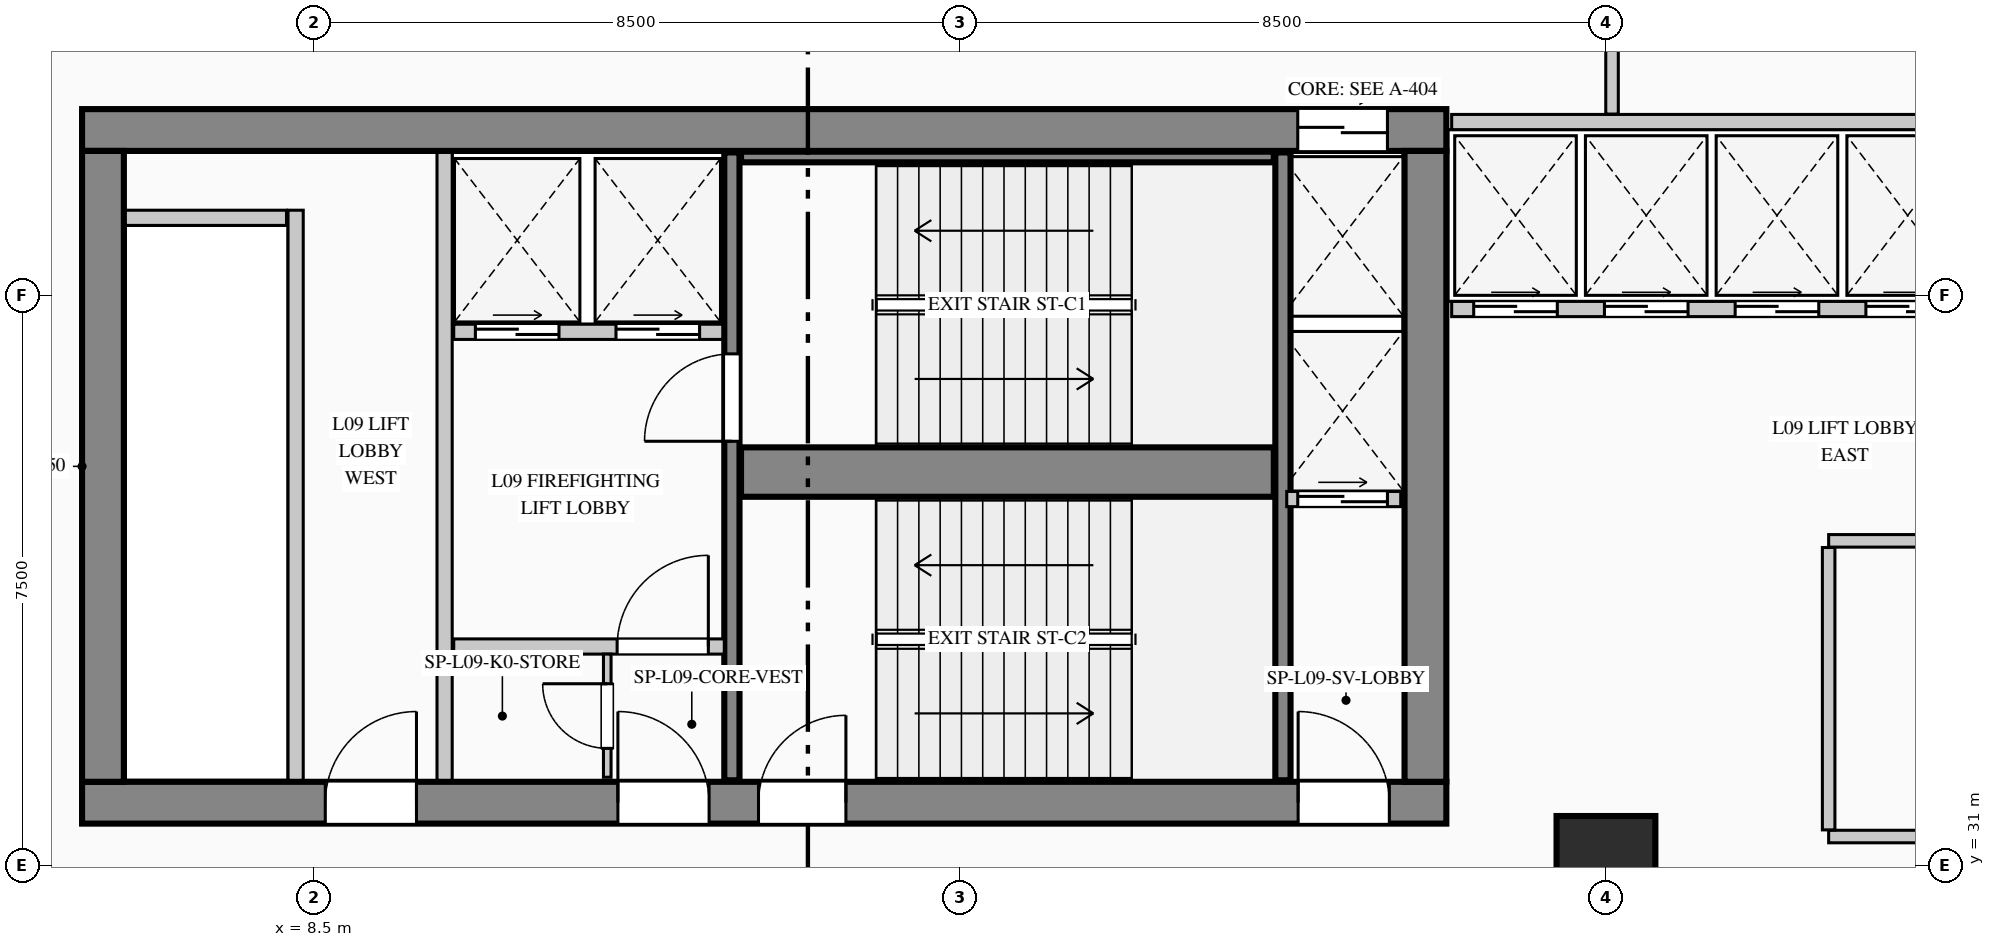
"""IFC4 building model, lengths in metres.
Left out: names, types, materials, properties, quantities, classifications, styles, units other than length and angle.
Written with IfcOpenShell. Run it as: python <this file> out.ifc"""

import sys

from ifc_helpers import new_model, si_unit, direction, frame, frame_2d, origin, origin_2d, place, context, subcontext, project, spatial, rectangle, extrude, element, fill, save


model = new_model("IFC4")
c1 = context("Model", 3, precision=1e-05, world=origin(), true_north=direction((0.0, 1.0)))
c2 = subcontext(c1, "Body", "Model", "MODEL_VIEW")
j1 = project(units=[si_unit("LENGTHUNIT", "METRE"), si_unit("PLANEANGLEUNIT", "RADIAN")], contexts=[c1])
p1 = place(None, origin())
s1 = spatial("IfcSite", under=j1, at=p1, CompositionType="ELEMENT")
p2 = place(p1, origin())
s2 = spatial("IfcBuilding", under=s1, at=p2, CompositionType="ELEMENT")
p3 = place(p2, frame((0.0, 0.0, 40.2)))
s3 = spatial("IfcBuildingStorey", under=s2, at=p3, CompositionType="ELEMENT", Elevation=40.2)
p4 = place(p3, frame((5.45, 40.675, 0.0), z_axis=(0.0, 0.0, 1.0), x_axis=(1.0, 0.0, 0.0)))
e1 = element("IfcWall", 1, at=p4, inside=s3, PredefinedType="SHEAR", context=c2, shape_type="SweptSolid", body=[
    extrude(rectangle(XDim=17.95, YDim=0.55, at=frame_2d((8.975, 0.0))), origin(), (0.0, 0.0, 1.0), 4.4),
])
p5 = place(p4, frame((15.995, 0.0, 0.0)))
e2 = element("IfcOpeningElement", 2, at=p5, cuts=e1, PredefinedType="OPENING", context=c2, shape_type="SweptSolid", body=[
    extrude(rectangle(XDim=1.18, YDim=2.25, at=frame_2d((0.59, 1.125))), frame((0.0, 0.285, 0.0), z_axis=(0.0, -1.0, 0.0), x_axis=(1.0, 0.0, 0.0)), (0.0, 0.0, 1.0), 0.57),
])
p6 = place(p3, frame((5.45, 31.825, 0.0), z_axis=(0.0, 0.0, 1.0), x_axis=(1.0, 0.0, 0.0)))
e3 = element("IfcWall", 3, at=p6, inside=s3, PredefinedType="SHEAR", context=c2, shape_type="SweptSolid", body=[
    extrude(rectangle(XDim=17.95, YDim=0.55, at=frame_2d((8.975, 0.0))), origin(), (0.0, 0.0, 1.0), 4.4),
])
p7 = place(p6, frame((3.2, 0.0, 0.0)))
e4 = element("IfcOpeningElement", 4, at=p7, cuts=e3, PredefinedType="OPENING", context=c2, shape_type="SweptSolid", body=[
    extrude(rectangle(XDim=1.2, YDim=2.2, at=frame_2d((0.6, 1.1))), frame((0.0, 0.285, 0.0), z_axis=(0.0, -1.0, 0.0), x_axis=(1.0, 0.0, 0.0)), (0.0, 0.0, 1.0), 0.57),
])
p8 = place(p6, frame((7.05, 0.0, 0.0)))
e5 = element("IfcOpeningElement", 5, at=p8, cuts=e3, PredefinedType="OPENING", context=c2, shape_type="SweptSolid", body=[
    extrude(rectangle(XDim=1.2, YDim=2.2, at=frame_2d((0.6, 1.1))), frame((0.0, 0.285, 0.0), z_axis=(0.0, -1.0, 0.0), x_axis=(1.0, 0.0, 0.0)), (0.0, 0.0, 1.0), 0.57),
])
p9 = place(p6, frame((8.9, 0.0, 0.0)))
e6 = element("IfcOpeningElement", 6, at=p9, cuts=e3, PredefinedType="OPENING", context=c2, shape_type="SweptSolid", body=[
    extrude(rectangle(XDim=1.15, YDim=2.2, at=frame_2d((0.575, 1.1))), frame((0.0, 0.285, 0.0), z_axis=(0.0, -1.0, 0.0), x_axis=(1.0, 0.0, 0.0)), (0.0, 0.0, 1.0), 0.57),
])
p10 = place(p6, frame((16.0, 0.0, 0.0)))
e7 = element("IfcOpeningElement", 7, at=p10, cuts=e3, PredefinedType="OPENING", context=c2, shape_type="SweptSolid", body=[
    extrude(rectangle(XDim=1.2, YDim=2.2, at=frame_2d((0.6, 1.1))), frame((0.0, 0.285, 0.0), z_axis=(0.0, -1.0, 0.0), x_axis=(1.0, 0.0, 0.0)), (0.0, 0.0, 1.0), 0.57),
])
for number, where, z_axis, x_axis in (
    (8, (5.725, 32.1, 0.0), (0.0, 0.0, 1.0), (0.0, 1.0, 0.0)),
    (9, (23.125, 32.1, 0.0), (0.0, 0.0, 1.0), (0.0, 1.0, 0.0)),
):
    element("IfcWall", number, at=place(p3, frame(where, z_axis=z_axis, x_axis=x_axis)), inside=s3, PredefinedType="SHEAR", context=c2, shape_type="SweptSolid", body=[
        extrude(rectangle(XDim=8.3, YDim=0.55, at=frame_2d((4.15, 0.0))), origin(), (0.0, 0.0, 1.0), 4.4),
    ])
p11 = place(p3, frame((14.0, 32.12, 0.0), z_axis=(0.0, 0.0, 1.0), x_axis=(0.0, 1.0, 0.0)))
e10 = element("IfcWall", 10, at=p11, inside=s3, PredefinedType="SHEAR", context=c2, shape_type="SweptSolid", body=[
    extrude(rectangle(XDim=8.26, YDim=0.2, at=frame_2d((4.13, 0.0))), origin(), (0.0, 0.0, 1.0), 4.4),
])
p12 = place(p11, frame((4.46, 0.0, 0.0)))
e11 = element("IfcOpeningElement", 11, at=p12, cuts=e10, PredefinedType="OPENING", context=c2, shape_type="SweptSolid", body=[
    extrude(rectangle(XDim=1.15, YDim=2.2, at=frame_2d((0.575, 1.1))), frame((0.0, 0.11, 0.0), z_axis=(0.0, -1.0, 0.0), x_axis=(1.0, 0.0, 0.0)), (0.0, 0.0, 1.0), 0.22),
])
p13 = place(p3, frame((14.12, 36.175, 0.0), z_axis=(0.0, 0.0, 1.0), x_axis=(1.0, 0.0, 0.0)))
e12 = element("IfcWall", 12, at=p13, inside=s3, PredefinedType="SHEAR", context=c2, shape_type="SweptSolid", body=[
    extrude(rectangle(XDim=7.01, YDim=0.65, at=frame_2d((3.505, 0.0))), origin(), (0.0, 0.0, 1.0), 4.4),
])
p14 = place(p3, frame((21.25, 32.12, 0.0), z_axis=(0.0, 0.0, 1.0), x_axis=(0.0, 1.0, 0.0)))
e13 = element("IfcWall", 13, at=p14, inside=s3, PredefinedType="SHEAR", context=c2, shape_type="SweptSolid", body=[
    extrude(rectangle(XDim=8.26, YDim=0.2, at=frame_2d((4.13, 0.0))), origin(), (0.0, 0.0, 1.0), 4.4),
])
p15 = place(p3, frame((14.12, 40.32, 0.0), z_axis=(0.0, 0.0, 1.0), x_axis=(1.0, 0.0, 0.0)))
e14 = element("IfcWall", 14, at=p15, inside=s3, PredefinedType="SHEAR", context=c2, shape_type="SweptSolid", body=[
    extrude(rectangle(XDim=7.01, YDim=0.14, at=frame_2d((3.505, 0.0))), origin(), (0.0, 0.0, 1.0), 4.4),
])
p16 = place(p3, frame((25.5, 31.0, 0.0), z_axis=(0.0, 0.0, 1.0), x_axis=(1.0, 0.0, 0.0)))
e15 = element("IfcColumn", 15, at=p16, inside=s3, PredefinedType="COLUMN", context=c2, shape_type="SweptSolid", body=[
    extrude(rectangle(XDim=1.3, YDim=1.3, at=origin_2d()), origin(), (0.0, 0.0, 1.0), 4.4),
])
p17 = place(p3, frame((8.523, 4.84, 0.0), z_axis=(0.0, 0.0, 1.0), x_axis=(-0.150394554312, 0.988626055712, 0.0)))
e16 = element("IfcWall", 16, at=p17, inside=s3, PredefinedType="STANDARD", context=c2, shape_type="SweptSolid", body=[
    extrude(rectangle(XDim=36.738, YDim=0.28, at=frame_2d((18.369, 0.0))), origin(), (0.0, 0.0, 1.0), 4.1),
])
p18 = place(p17, frame((22.762, 0.0, 0.9)))
e17 = element("IfcOpeningElement", 17, at=p18, cuts=e16, PredefinedType="OPENING", context=c2, shape_type="SweptSolid", body=[
    extrude(rectangle(XDim=1.5, YDim=1.8, at=frame_2d((0.75, 0.9))), frame((0.0, 0.15, 0.0), z_axis=(0.0, -1.0, 0.0), x_axis=(1.0, 0.0, 0.0)), (0.0, 0.0, 1.0), 0.3),
])
p19 = place(p3, frame((8.26, 32.12, 0.0), z_axis=(0.0, 0.0, 1.0), x_axis=(0.0, 1.0, 0.0)))
e18 = element("IfcWall", 18, at=p19, inside=s3, PredefinedType="PARTITIONING", context=c2, shape_type="SweptSolid", body=[
    extrude(rectangle(XDim=7.5, YDim=0.2, at=frame_2d((3.75, 0.0))), origin(), (0.0, 0.0, 1.0), 4.1),
])
p20 = place(p3, frame((6.02, 39.52, 0.0), z_axis=(0.0, 0.0, 1.0), x_axis=(1.0, 0.0, 0.0)))
e19 = element("IfcWall", 19, at=p20, inside=s3, PredefinedType="PARTITIONING", context=c2, shape_type="SweptSolid", body=[
    extrude(rectangle(XDim=2.12, YDim=0.2, at=frame_2d((1.06, 0.0))), origin(), (0.0, 0.0, 1.0), 4.1),
])
p21 = place(p3, frame((10.22, 32.12, 0.0), z_axis=(0.0, 0.0, 1.0), x_axis=(0.0, 1.0, 0.0)))
e20 = element("IfcWall", 20, at=p21, inside=s3, PredefinedType="PARTITIONING", context=c2, shape_type="SweptSolid", body=[
    extrude(rectangle(XDim=8.26, YDim=0.2, at=frame_2d((4.13, 0.0))), origin(), (0.0, 0.0, 1.0), 4.1),
])
p22 = place(p3, frame((10.34, 38.02, 0.0), z_axis=(0.0, 0.0, 1.0), x_axis=(1.0, 0.0, 0.0)))
e21 = element("IfcWall", 21, at=p22, inside=s3, PredefinedType="PARTITIONING", context=c2, shape_type="SweptSolid", body=[
    extrude(rectangle(XDim=3.54, YDim=0.2, at=frame_2d((1.77, 0.0))), origin(), (0.0, 0.0, 1.0), 4.1),
])
p23 = place(p22, frame((0.285, 0.0, 0.0)))
e22 = element("IfcOpeningElement", 22, at=p23, cuts=e21, PredefinedType="OPENING", context=c2, shape_type="SweptSolid", body=[
    extrude(rectangle(XDim=1.1, YDim=2.2, at=frame_2d((0.55, 1.1))), frame((0.0, 0.11, 0.0), z_axis=(0.0, -1.0, 0.0), x_axis=(1.0, 0.0, 0.0)), (0.0, 0.0, 1.0), 0.22),
])
p24 = place(p22, frame((2.135, 0.0, 0.0)))
e23 = element("IfcOpeningElement", 23, at=p24, cuts=e21, PredefinedType="OPENING", context=c2, shape_type="SweptSolid", body=[
    extrude(rectangle(XDim=1.1, YDim=2.2, at=frame_2d((0.55, 1.1))), frame((0.0, 0.11, 0.0), z_axis=(0.0, -1.0, 0.0), x_axis=(1.0, 0.0, 0.0)), (0.0, 0.0, 1.0), 0.22),
])
p25 = place(p3, frame((10.34, 33.88, 0.0), z_axis=(0.0, 0.0, 1.0), x_axis=(1.0, 0.0, 0.0)))
e24 = element("IfcWall", 24, at=p25, inside=s3, PredefinedType="PARTITIONING", context=c2, shape_type="SweptSolid", body=[
    extrude(rectangle(XDim=3.56, YDim=0.2, at=frame_2d((1.78, 0.0))), origin(), (0.0, 0.0, 1.0), 4.1),
])
p26 = place(p25, frame((2.15, 0.0, 0.0)))
e25 = element("IfcOpeningElement", 25, at=p26, cuts=e24, PredefinedType="OPENING", context=c2, shape_type="SweptSolid", body=[
    extrude(rectangle(XDim=1.2, YDim=2.2, at=frame_2d((0.6, 1.1))), frame((0.0, 0.11, 0.0), z_axis=(0.0, -1.0, 0.0), x_axis=(1.0, 0.0, 0.0)), (0.0, 0.0, 1.0), 0.22),
])
p27 = place(p3, frame((12.36, 32.16, 0.0), z_axis=(0.0, 0.0, 1.0), x_axis=(0.0, 1.0, 0.0)))
e26 = element("IfcWall", 26, at=p27, inside=s3, PredefinedType="PARTITIONING", context=c2, shape_type="SweptSolid", body=[
    extrude(rectangle(XDim=1.62, YDim=0.1, at=frame_2d((0.81, 0.0))), origin(), (0.0, 0.0, 1.0), 4.1),
])
p28 = place(p27, frame((0.38, 0.0, 0.0)))
e27 = element("IfcOpeningElement", 27, at=p28, cuts=e26, PredefinedType="OPENING", context=c2, shape_type="SweptSolid", body=[
    extrude(rectangle(XDim=0.85, YDim=2.1, at=frame_2d((0.425, 1.05))), frame((0.0, 0.06, 0.0), z_axis=(0.0, -1.0, 0.0), x_axis=(1.0, 0.0, 0.0)), (0.0, 0.0, 1.0), 0.12),
])
p29 = place(p3, frame((21.3, 35.82, 0.0), z_axis=(0.0, 0.0, 1.0), x_axis=(1.0, 0.0, 0.0)))
e28 = element("IfcWall", 28, at=p29, inside=s3, PredefinedType="PARTITIONING", context=c2, shape_type="SweptSolid", body=[
    extrude(rectangle(XDim=1.5, YDim=0.2, at=frame_2d((0.75, 0.0))), origin(), (0.0, 0.0, 1.0), 4.1),
])
p30 = place(p29, frame((0.145, 0.0, 0.0)))
e29 = element("IfcOpeningElement", 29, at=p30, cuts=e28, PredefinedType="OPENING", context=c2, shape_type="SweptSolid", body=[
    extrude(rectangle(XDim=1.18, YDim=2.25, at=frame_2d((0.59, 1.125))), frame((0.0, 0.11, 0.0), z_axis=(0.0, -1.0, 0.0), x_axis=(1.0, 0.0, 0.0)), (0.0, 0.0, 1.0), 0.22),
])
p31 = place(p3, frame((23.47, 40.78, 0.0), z_axis=(0.0, 0.0, 1.0), x_axis=(1.0, 0.0, 0.0)))
e30 = element("IfcWall", 30, at=p31, inside=s3, PredefinedType="PARTITIONING", context=c2, shape_type="SweptSolid", body=[
    extrude(rectangle(XDim=6.91, YDim=0.2, at=frame_2d((3.455, 0.0))), origin(), (0.0, 0.0, 1.0), 4.1),
])
p32 = place(p3, frame((23.47, 38.32, 0.0), z_axis=(0.0, 0.0, 1.0), x_axis=(1.0, 0.0, 0.0)))
e31 = element("IfcWall", 31, at=p32, inside=s3, PredefinedType="PARTITIONING", context=c2, shape_type="SweptSolid", body=[
    extrude(rectangle(XDim=6.79, YDim=0.2, at=frame_2d((3.395, 0.0))), origin(), (0.0, 0.0, 1.0), 4.1),
])
p33 = place(p32, frame((0.29, 0.0, 0.0)))
e32 = element("IfcOpeningElement", 32, at=p33, cuts=e31, PredefinedType="OPENING", context=c2, shape_type="SweptSolid", body=[
    extrude(rectangle(XDim=1.1, YDim=2.2, at=frame_2d((0.55, 1.1))), frame((0.0, 0.11, 0.0), z_axis=(0.0, -1.0, 0.0), x_axis=(1.0, 0.0, 0.0)), (0.0, 0.0, 1.0), 0.22),
])
p34 = place(p32, frame((2.01, 0.0, 0.0)))
e33 = element("IfcOpeningElement", 33, at=p34, cuts=e31, PredefinedType="OPENING", context=c2, shape_type="SweptSolid", body=[
    extrude(rectangle(XDim=1.1, YDim=2.2, at=frame_2d((0.55, 1.1))), frame((0.0, 0.11, 0.0), z_axis=(0.0, -1.0, 0.0), x_axis=(1.0, 0.0, 0.0)), (0.0, 0.0, 1.0), 0.22),
])
p35 = place(p32, frame((3.73, 0.0, 0.0)))
e34 = element("IfcOpeningElement", 34, at=p35, cuts=e31, PredefinedType="OPENING", context=c2, shape_type="SweptSolid", body=[
    extrude(rectangle(XDim=1.1, YDim=2.2, at=frame_2d((0.55, 1.1))), frame((0.0, 0.11, 0.0), z_axis=(0.0, -1.0, 0.0), x_axis=(1.0, 0.0, 0.0)), (0.0, 0.0, 1.0), 0.22),
])
p36 = place(p32, frame((5.45, 0.0, 0.0)))
e35 = element("IfcOpeningElement", 35, at=p36, cuts=e31, PredefinedType="OPENING", context=c2, shape_type="SweptSolid", body=[
    extrude(rectangle(XDim=1.1, YDim=2.2, at=frame_2d((0.55, 1.1))), frame((0.0, 0.11, 0.0), z_axis=(0.0, -1.0, 0.0), x_axis=(1.0, 0.0, 0.0)), (0.0, 0.0, 1.0), 0.22),
])
p37 = place(p3, frame((28.43, 35.27, 0.0), z_axis=(0.0, 0.0, 1.0), x_axis=(1.0, 0.0, 0.0)))
e36 = element("IfcWall", 36, at=p37, inside=s3, PredefinedType="PARTITIONING", context=c2, shape_type="SweptSolid", body=[
    extrude(rectangle(XDim=1.79, YDim=0.165, at=frame_2d((0.895, 0.0))), origin(), (0.0, 0.0, 1.0), 4.1),
])
p38 = place(p3, frame((25.58, 40.885, 0.0), z_axis=(0.0, 0.0, 1.0), x_axis=(0.0, 1.0, 0.0)))
e37 = element("IfcWall", 37, at=p38, inside=s3, PredefinedType="PARTITIONING", context=c2, shape_type="SweptSolid", body=[
    extrude(rectangle(XDim=2.33, YDim=0.165, at=frame_2d((1.165, 0.0))), origin(), (0.0, 0.0, 1.0), 4.1),
])
p39 = place(p3, frame((33.325, 31.38, 0.0), z_axis=(0.0, 0.0, 1.0), x_axis=(-1.0, 0.0, 0.0)))
e38 = element("IfcWall", 38, at=p39, inside=s3, PredefinedType="PARTITIONING", context=c2, shape_type="SweptSolid", body=[
    extrude(rectangle(XDim=4.895, YDim=0.165, at=frame_2d((2.448, 0.0))), origin(), (0.0, 0.0, 1.0), 4.1),
])
p40 = place(p39, frame((1.948, 0.0, 0.0)))
e39 = element("IfcOpeningElement", 39, at=p40, cuts=e38, PredefinedType="OPENING", context=c2, shape_type="SweptSolid", body=[
    extrude(rectangle(XDim=1.0, YDim=2.15, at=frame_2d((0.5, 1.075))), frame((0.0, 0.093, 0.0), z_axis=(0.0, -1.0, 0.0), x_axis=(1.0, 0.0, 0.0)), (0.0, 0.0, 1.0), 0.185),
])
p41 = place(p3, frame((28.43, 31.468, 0.0), z_axis=(0.0, 0.0, 1.0), x_axis=(0.0, 1.0, 0.0)))
e40 = element("IfcWall", 40, at=p41, inside=s3, PredefinedType="PARTITIONING", context=c2, shape_type="SweptSolid", body=[
    extrude(rectangle(XDim=3.715, YDim=0.165, at=frame_2d((1.857, 0.0))), origin(), (0.0, 0.0, 1.0), 4.1),
])
p42 = place(p7, origin())
e41 = element("IfcDoor", 41, at=p42, inside=s3, OperationType="SINGLE_SWING_RIGHT", PredefinedType="DOOR", context=c2, shape_type="SweptSolid", body=[
    extrude(rectangle(XDim=1.2, YDim=2.2, at=frame_2d((0.6, 1.1))), frame((0.0, 0.025, 0.0), z_axis=(0.0, -1.0, 0.0), x_axis=(1.0, 0.0, 0.0)), (0.0, 0.0, 1.0), 0.05),
])
fill(e4, e41)
p43 = place(p8, origin())
e42 = element("IfcDoor", 42, at=p43, inside=s3, OperationType="SINGLE_SWING_LEFT", PredefinedType="DOOR", context=c2, shape_type="SweptSolid", body=[
    extrude(rectangle(XDim=1.2, YDim=2.2, at=frame_2d((0.6, 1.1))), frame((0.0, 0.025, 0.0), z_axis=(0.0, -1.0, 0.0), x_axis=(1.0, 0.0, 0.0)), (0.0, 0.0, 1.0), 0.05),
])
fill(e5, e42)
p44 = place(p9, origin())
e43 = element("IfcDoor", 43, at=p44, inside=s3, OperationType="SINGLE_SWING_RIGHT", PredefinedType="DOOR", context=c2, shape_type="SweptSolid", body=[
    extrude(rectangle(XDim=1.15, YDim=2.2, at=frame_2d((0.575, 1.1))), frame((0.0, 0.025, 0.0), z_axis=(0.0, -1.0, 0.0), x_axis=(1.0, 0.0, 0.0)), (0.0, 0.0, 1.0), 0.05),
])
fill(e6, e43)
p45 = place(p10, origin())
e44 = element("IfcDoor", 44, at=p45, inside=s3, OperationType="SINGLE_SWING_LEFT", PredefinedType="DOOR", context=c2, shape_type="SweptSolid", body=[
    extrude(rectangle(XDim=1.2, YDim=2.2, at=frame_2d((0.6, 1.1))), frame((0.0, 0.025, 0.0), z_axis=(0.0, -1.0, 0.0), x_axis=(1.0, 0.0, 0.0)), (0.0, 0.0, 1.0), 0.05),
])
fill(e7, e44)
p46 = place(p26, origin())
e45 = element("IfcDoor", 45, at=p46, inside=s3, OperationType="SINGLE_SWING_RIGHT", PredefinedType="DOOR", context=c2, shape_type="SweptSolid", body=[
    extrude(rectangle(XDim=1.2, YDim=2.2, at=frame_2d((0.6, 1.1))), frame((0.0, 0.025, 0.0), z_axis=(0.0, -1.0, 0.0), x_axis=(1.0, 0.0, 0.0)), (0.0, 0.0, 1.0), 0.05),
])
fill(e25, e45)
p47 = place(p28, origin())
e46 = element("IfcDoor", 46, at=p47, inside=s3, OperationType="SINGLE_SWING_RIGHT", PredefinedType="DOOR", context=c2, shape_type="SweptSolid", body=[
    extrude(rectangle(XDim=0.85, YDim=2.1, at=frame_2d((0.425, 1.05))), frame((0.0, 0.025, 0.0), z_axis=(0.0, -1.0, 0.0), x_axis=(1.0, 0.0, 0.0)), (0.0, 0.0, 1.0), 0.05),
])
fill(e27, e46)
p48 = place(p12, origin())
e47 = element("IfcDoor", 47, at=p48, inside=s3, OperationType="SINGLE_SWING_LEFT", PredefinedType="DOOR", context=c2, shape_type="SweptSolid", body=[
    extrude(rectangle(XDim=1.15, YDim=2.2, at=frame_2d((0.575, 1.1))), frame((0.0, 0.025, 0.0), z_axis=(0.0, -1.0, 0.0), x_axis=(1.0, 0.0, 0.0)), (0.0, 0.0, 1.0), 0.05),
])
fill(e11, e47)
p49 = place(p23, origin())
e48 = element("IfcDoor", 48, at=p49, inside=s3, OperationType="DOUBLE_DOOR_SLIDING", PredefinedType="DOOR", context=c2, shape_type="SweptSolid", body=[
    extrude(rectangle(XDim=1.1, YDim=2.2, at=frame_2d((0.55, 1.1))), frame((0.0, 0.025, 0.0), z_axis=(0.0, -1.0, 0.0), x_axis=(1.0, 0.0, 0.0)), (0.0, 0.0, 1.0), 0.05),
])
fill(e22, e48)
p50 = place(p24, origin())
e49 = element("IfcDoor", 49, at=p50, inside=s3, OperationType="DOUBLE_DOOR_SLIDING", PredefinedType="DOOR", context=c2, shape_type="SweptSolid", body=[
    extrude(rectangle(XDim=1.1, YDim=2.2, at=frame_2d((0.55, 1.1))), frame((0.0, 0.025, 0.0), z_axis=(0.0, -1.0, 0.0), x_axis=(1.0, 0.0, 0.0)), (0.0, 0.0, 1.0), 0.05),
])
fill(e23, e49)
p51 = place(p5, origin())
e50 = element("IfcDoor", 50, at=p51, inside=s3, OperationType="DOUBLE_DOOR_SLIDING", PredefinedType="DOOR", context=c2, shape_type="SweptSolid", body=[
    extrude(rectangle(XDim=1.18, YDim=2.25, at=frame_2d((0.59, 1.125))), frame((0.0, 0.025, 0.0), z_axis=(0.0, -1.0, 0.0), x_axis=(1.0, 0.0, 0.0)), (0.0, 0.0, 1.0), 0.05),
])
fill(e2, e50)
p52 = place(p30, origin())
e51 = element("IfcDoor", 51, at=p52, inside=s3, OperationType="DOUBLE_DOOR_SLIDING", PredefinedType="DOOR", context=c2, shape_type="SweptSolid", body=[
    extrude(rectangle(XDim=1.18, YDim=2.25, at=frame_2d((0.59, 1.125))), frame((0.0, 0.025, 0.0), z_axis=(0.0, -1.0, 0.0), x_axis=(1.0, 0.0, 0.0)), (0.0, 0.0, 1.0), 0.05),
])
fill(e29, e51)
p53 = place(p33, origin())
e52 = element("IfcDoor", 52, at=p53, inside=s3, OperationType="DOUBLE_DOOR_SLIDING", PredefinedType="DOOR", context=c2, shape_type="SweptSolid", body=[
    extrude(rectangle(XDim=1.1, YDim=2.2, at=frame_2d((0.55, 1.1))), frame((0.0, 0.025, 0.0), z_axis=(0.0, -1.0, 0.0), x_axis=(1.0, 0.0, 0.0)), (0.0, 0.0, 1.0), 0.05),
])
fill(e32, e52)
p54 = place(p34, origin())
e53 = element("IfcDoor", 53, at=p54, inside=s3, OperationType="DOUBLE_DOOR_SLIDING", PredefinedType="DOOR", context=c2, shape_type="SweptSolid", body=[
    extrude(rectangle(XDim=1.1, YDim=2.2, at=frame_2d((0.55, 1.1))), frame((0.0, 0.025, 0.0), z_axis=(0.0, -1.0, 0.0), x_axis=(1.0, 0.0, 0.0)), (0.0, 0.0, 1.0), 0.05),
])
fill(e33, e53)
p55 = place(p35, origin())
e54 = element("IfcDoor", 54, at=p55, inside=s3, OperationType="DOUBLE_DOOR_SLIDING", PredefinedType="DOOR", context=c2, shape_type="SweptSolid", body=[
    extrude(rectangle(XDim=1.1, YDim=2.2, at=frame_2d((0.55, 1.1))), frame((0.0, 0.025, 0.0), z_axis=(0.0, -1.0, 0.0), x_axis=(1.0, 0.0, 0.0)), (0.0, 0.0, 1.0), 0.05),
])
fill(e34, e54)
p56 = place(p36, origin())
e55 = element("IfcDoor", 55, at=p56, inside=s3, OperationType="DOUBLE_DOOR_SLIDING", PredefinedType="DOOR", context=c2, shape_type="SweptSolid", body=[
    extrude(rectangle(XDim=1.1, YDim=2.2, at=frame_2d((0.55, 1.1))), frame((0.0, 0.025, 0.0), z_axis=(0.0, -1.0, 0.0), x_axis=(1.0, 0.0, 0.0)), (0.0, 0.0, 1.0), 0.05),
])
fill(e35, e55)
save(model, sys.argv[1])
